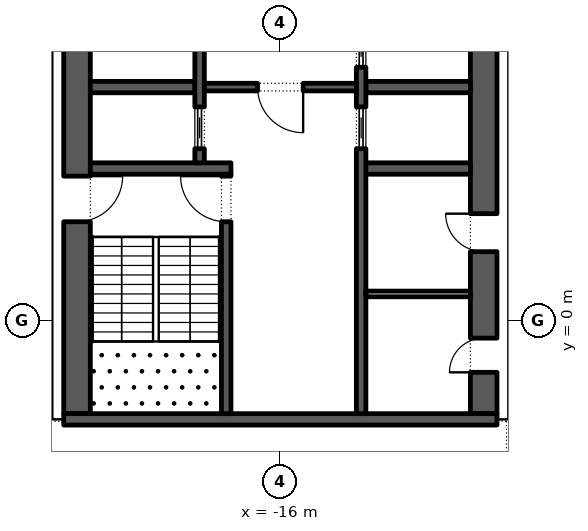
"""IFC4 building model, lengths in metres.
Left out: names, types, materials, properties, quantities, classifications, styles, units other than length and angle.
Written with IfcOpenShell. Run it as: python <this file> out.ifc"""

import sys

from ifc_helpers import new_model, si_unit, direction, frame, frame_2d, origin, place, context, subcontext, project, spatial, rectangle, extrude, element, fill, save


model = new_model("IFC4")
c1 = context("Model", 3, precision=1e-05, world=origin(), true_north=direction((0.0, 1.0)))
c2 = subcontext(c1, "Body", "Model", "MODEL_VIEW")
j1 = project(units=[si_unit("LENGTHUNIT", "METRE"), si_unit("PLANEANGLEUNIT", "RADIAN")], contexts=[c1])
p1 = place(None, origin())
s1 = spatial("IfcSite", under=j1, at=p1, CompositionType="ELEMENT")
p2 = place(p1, origin())
s2 = spatial("IfcBuilding", under=s1, at=p2, CompositionType="ELEMENT")
p3 = place(p2, frame((0.0, 0.0, 217.8)))
s3 = spatial("IfcBuildingStorey", under=s2, at=p3, CompositionType="ELEMENT", Elevation=217.8)
p4 = place(p3, frame((-33.157, 30.092, 0.0), z_axis=(0.0, 0.0, 1.0), x_axis=(0.224950279389, -0.974370243697, 0.0)))
e1 = element("IfcWall", 1, at=p4, inside=s3, PredefinedType="STANDARD", context=c2, shape_type="SweptSolid", body=[
    extrude(rectangle(XDim=49.5, YDim=0.3, at=frame_2d((24.75, 0.0))), origin(), (0.0, 0.0, 1.0), 3.95),
])
p5 = place(p4, frame((2.207, 0.0, 0.0)))
e2 = element("IfcOpeningElement", 2, at=p5, cuts=e1, PredefinedType="OPENING", context=c2, shape_type="SweptSolid", body=[
    extrude(rectangle(XDim=2.4, YDim=3.5, at=frame_2d((1.2, 1.75))), frame((0.0, 0.16, 0.0), z_axis=(0.0, -1.0, 0.0), x_axis=(1.0, 0.0, 0.0)), (0.0, 0.0, 1.0), 0.32),
])
p6 = place(p4, frame((8.121, 0.0, 0.45)))
e3 = element("IfcOpeningElement", 3, at=p6, cuts=e1, PredefinedType="OPENING", context=c2, shape_type="SweptSolid", body=[
    extrude(rectangle(XDim=4.5, YDim=2.775, at=frame_2d((2.25, 1.387))), frame((0.0, 0.16, 0.0), z_axis=(0.0, -1.0, 0.0), x_axis=(1.0, 0.0, 0.0)), (0.0, 0.0, 1.0), 0.32),
])
p7 = place(p4, frame((15.236, 0.0, 0.45)))
e4 = element("IfcOpeningElement", 4, at=p7, cuts=e1, PredefinedType="OPENING", context=c2, shape_type="SweptSolid", body=[
    extrude(rectangle(XDim=4.5, YDim=2.9, at=frame_2d((2.25, 1.45))), frame((0.0, 0.16, 0.0), z_axis=(0.0, -1.0, 0.0), x_axis=(1.0, 0.0, 0.0)), (0.0, 0.0, 1.0), 0.32),
])
p8 = place(p4, frame((22.35, 0.0, 0.45)))
e5 = element("IfcOpeningElement", 5, at=p8, cuts=e1, PredefinedType="OPENING", context=c2, shape_type="SweptSolid", body=[
    extrude(rectangle(XDim=4.5, YDim=2.95, at=frame_2d((2.25, 1.475))), frame((0.0, 0.16, 0.0), z_axis=(0.0, -1.0, 0.0), x_axis=(1.0, 0.0, 0.0)), (0.0, 0.0, 1.0), 0.32),
])
p9 = place(p4, frame((30.514, 0.0, 0.0)))
e6 = element("IfcOpeningElement", 6, at=p9, cuts=e1, PredefinedType="OPENING", context=c2, shape_type="SweptSolid", body=[
    extrude(rectangle(XDim=2.4, YDim=3.5, at=frame_2d((1.2, 1.75))), frame((0.0, 0.16, 0.0), z_axis=(0.0, -1.0, 0.0), x_axis=(1.0, 0.0, 0.0)), (0.0, 0.0, 1.0), 0.32),
])
p10 = place(p4, frame((36.579, 0.0, 0.45)))
e7 = element("IfcOpeningElement", 7, at=p10, cuts=e1, PredefinedType="OPENING", context=c2, shape_type="SweptSolid", body=[
    extrude(rectangle(XDim=4.5, YDim=3.05, at=frame_2d((2.25, 1.525))), frame((0.0, 0.16, 0.0), z_axis=(0.0, -1.0, 0.0), x_axis=(1.0, 0.0, 0.0)), (0.0, 0.0, 1.0), 0.32),
])
p11 = place(p4, frame((43.693, 0.0, 0.45)))
e8 = element("IfcOpeningElement", 8, at=p11, cuts=e1, PredefinedType="OPENING", context=c2, shape_type="SweptSolid", body=[
    extrude(rectangle(XDim=4.5, YDim=3.05, at=frame_2d((2.25, 1.525))), frame((0.0, 0.16, 0.0), z_axis=(0.0, -1.0, 0.0), x_axis=(1.0, 0.0, 0.0)), (0.0, 0.0, 1.0), 0.32),
])
p12 = place(p3, frame((-21.35, -2.45, 0.0), z_axis=(0.0, 0.0, 1.0), x_axis=(0.0, 1.0, 0.0)))
e9 = element("IfcWall", 9, at=p12, inside=s3, PredefinedType="SHEAR", context=c2, shape_type="SweptSolid", body=[
    extrude(rectangle(XDim=27.9, YDim=0.7, at=frame_2d((13.95, 0.0))), origin(), (0.0, 0.0, 1.0), 3.95),
])
p13 = place(p12, frame((5.05, 0.0, 0.0)))
e10 = element("IfcOpeningElement", 10, at=p13, cuts=e9, PredefinedType="OPENING", context=c2, shape_type="SweptSolid", body=[
    extrude(rectangle(XDim=1.2, YDim=2.1, at=frame_2d((0.6, 1.05))), frame((0.0, 0.36, 0.0), z_axis=(0.0, -1.0, 0.0), x_axis=(1.0, 0.0, 0.0)), (0.0, 0.0, 1.0), 0.72),
])
p14 = place(p12, frame((21.65, 0.0, 0.0)))
e11 = element("IfcOpeningElement", 11, at=p14, cuts=e9, PredefinedType="OPENING", context=c2, shape_type="SweptSolid", body=[
    extrude(rectangle(XDim=1.2, YDim=2.1, at=frame_2d((0.6, 1.05))), frame((0.0, 0.36, 0.0), z_axis=(0.0, -1.0, 0.0), x_axis=(1.0, 0.0, 0.0)), (0.0, 0.0, 1.0), 0.72),
])
p15 = place(p3, frame((-10.65, -2.45, 0.0), z_axis=(0.0, 0.0, 1.0), x_axis=(0.0, 1.0, 0.0)))
e12 = element("IfcWall", 12, at=p15, inside=s3, PredefinedType="SHEAR", context=c2, shape_type="SweptSolid", body=[
    extrude(rectangle(XDim=27.9, YDim=0.7, at=frame_2d((13.95, 0.0))), origin(), (0.0, 0.0, 1.0), 3.95),
])
p16 = place(p15, frame((23.65, 0.0, 0.0)))
e13 = element("IfcOpeningElement", 13, at=p16, cuts=e12, PredefinedType="OPENING", context=c2, shape_type="SweptSolid", body=[
    extrude(rectangle(XDim=2.4, YDim=2.1, at=frame_2d((1.2, 1.05))), frame((0.0, 0.36, 0.0), z_axis=(0.0, -1.0, 0.0), x_axis=(1.0, 0.0, 0.0)), (0.0, 0.0, 1.0), 0.72),
])
p17 = place(p15, frame((1.087, 0.0, 0.0)))
e14 = element("IfcOpeningElement", 14, at=p17, cuts=e12, PredefinedType="OPENING", context=c2, shape_type="SweptSolid", body=[
    extrude(rectangle(XDim=0.9, YDim=2.1, at=frame_2d((0.45, 1.05))), frame((0.0, 0.36, 0.0), z_axis=(0.0, -1.0, 0.0), x_axis=(1.0, 0.0, 0.0)), (0.0, 0.0, 1.0), 0.72),
])
p18 = place(p15, frame((4.262, 0.0, 0.0)))
e15 = element("IfcOpeningElement", 15, at=p18, cuts=e12, PredefinedType="OPENING", context=c2, shape_type="SweptSolid", body=[
    extrude(rectangle(XDim=1.0, YDim=2.1, at=frame_2d((0.5, 1.05))), frame((0.0, 0.36, 0.0), z_axis=(0.0, -1.0, 0.0), x_axis=(1.0, 0.0, 0.0)), (0.0, 0.0, 1.0), 0.72),
])
p19 = place(p3, frame((-21.7, -2.6, 0.0), z_axis=(0.0, 0.0, 1.0), x_axis=(1.0, 0.0, 0.0)))
e16 = element("IfcWall", 16, at=p19, inside=s3, PredefinedType="SHEAR", context=c2, shape_type="SweptSolid", body=[
    extrude(rectangle(XDim=11.4, YDim=0.3, at=frame_2d((5.7, 0.0))), origin(), (0.0, 0.0, 1.0), 3.95),
])
p20 = place(p3, frame((-21.0, 4.0, 0.0), z_axis=(0.0, 0.0, 1.0), x_axis=(1.0, 0.0, 0.0)))
e17 = element("IfcWall", 17, at=p20, inside=s3, PredefinedType="SHEAR", context=c2, shape_type="SweptSolid", body=[
    extrude(rectangle(XDim=3.7, YDim=0.3, at=frame_2d((1.85, 0.0))), origin(), (0.0, 0.0, 1.0), 3.95),
])
p21 = place(p3, frame((-17.425, -2.45, 0.0), z_axis=(0.0, 0.0, 1.0), x_axis=(0.0, 1.0, 0.0)))
e18 = element("IfcWall", 18, at=p21, inside=s3, PredefinedType="SHEAR", context=c2, shape_type="SweptSolid", body=[
    extrude(rectangle(XDim=6.3, YDim=0.25, at=frame_2d((3.15, 0.0))), origin(), (0.0, 0.0, 1.0), 3.95),
])
p22 = place(p21, frame((5.05, 0.0, 0.0)))
e19 = element("IfcOpeningElement", 19, at=p22, cuts=e18, PredefinedType="OPENING", context=c2, shape_type="SweptSolid", body=[
    extrude(rectangle(XDim=1.2, YDim=2.1, at=frame_2d((0.6, 1.05))), frame((0.0, 0.135, 0.0), z_axis=(0.0, -1.0, 0.0), x_axis=(1.0, 0.0, 0.0)), (0.0, 0.0, 1.0), 0.27),
])
p23 = place(p3, frame((-21.0, 6.143, 0.0), z_axis=(0.0, 0.0, 1.0), x_axis=(1.0, 0.0, 0.0)))
e20 = element("IfcWall", 20, at=p23, inside=s3, PredefinedType="SHEAR", context=c2, shape_type="SweptSolid", body=[
    extrude(rectangle(XDim=2.75, YDim=0.3, at=frame_2d((1.375, 0.0))), origin(), (0.0, 0.0, 1.0), 3.95),
])
p24 = place(p3, frame((-18.125, 4.15, 0.0), z_axis=(0.0, 0.0, 1.0), x_axis=(0.0, 1.0, 0.0)))
e21 = element("IfcWall", 21, at=p24, inside=s3, PredefinedType="SHEAR", context=c2, shape_type="SweptSolid", body=[
    extrude(rectangle(XDim=14.7, YDim=0.25, at=frame_2d((7.35, 0.0))), origin(), (0.0, 0.0, 1.0), 3.95),
])
p25 = place(p24, frame((3.246, 0.0, 0.0)))
e22 = element("IfcOpeningElement", 22, at=p25, cuts=e21, PredefinedType="OPENING", context=c2, shape_type="SweptSolid", body=[
    extrude(rectangle(XDim=0.9, YDim=2.1, at=frame_2d((0.45, 1.05))), frame((0.0, 0.135, 0.0), z_axis=(0.0, -1.0, 0.0), x_axis=(1.0, 0.0, 0.0)), (0.0, 0.0, 1.0), 0.27),
])
p26 = place(p24, frame((8.454, 0.0, 0.0)))
e23 = element("IfcOpeningElement", 23, at=p26, cuts=e21, PredefinedType="OPENING", context=c2, shape_type="SweptSolid", body=[
    extrude(rectangle(XDim=0.9, YDim=2.1, at=frame_2d((0.45, 1.05))), frame((0.0, 0.135, 0.0), z_axis=(0.0, -1.0, 0.0), x_axis=(1.0, 0.0, 0.0)), (0.0, 0.0, 1.0), 0.27),
])
p27 = place(p24, frame((0.371, 0.0, 0.0)))
e24 = element("IfcOpeningElement", 24, at=p27, cuts=e21, PredefinedType="OPENING", context=c2, shape_type="SweptSolid", body=[
    extrude(rectangle(XDim=1.1, YDim=2.1, at=frame_2d((0.55, 1.05))), frame((0.0, 0.135, 0.0), z_axis=(0.0, -1.0, 0.0), x_axis=(1.0, 0.0, 0.0)), (0.0, 0.0, 1.0), 0.27),
])
p28 = place(p24, frame((13.229, 0.0, 0.0)))
e25 = element("IfcOpeningElement", 25, at=p28, cuts=e21, PredefinedType="OPENING", context=c2, shape_type="SweptSolid", body=[
    extrude(rectangle(XDim=1.1, YDim=2.1, at=frame_2d((0.55, 1.05))), frame((0.0, 0.135, 0.0), z_axis=(0.0, -1.0, 0.0), x_axis=(1.0, 0.0, 0.0)), (0.0, 0.0, 1.0), 0.27),
])
p29 = place(p3, frame((-14.0, 4.0, 0.0), z_axis=(0.0, 0.0, 1.0), x_axis=(1.0, 0.0, 0.0)))
e26 = element("IfcWall", 26, at=p29, inside=s3, PredefinedType="SHEAR", context=c2, shape_type="SweptSolid", body=[
    extrude(rectangle(XDim=3.0, YDim=0.3, at=frame_2d((1.5, 0.0))), origin(), (0.0, 0.0, 1.0), 3.95),
])
p30 = place(p3, frame((-13.75, 6.143, 0.0), z_axis=(0.0, 0.0, 1.0), x_axis=(1.0, 0.0, 0.0)))
e27 = element("IfcWall", 27, at=p30, inside=s3, PredefinedType="SHEAR", context=c2, shape_type="SweptSolid", body=[
    extrude(rectangle(XDim=2.75, YDim=0.3, at=frame_2d((1.375, 0.0))), origin(), (0.0, 0.0, 1.0), 3.95),
])
p31 = place(p3, frame((-13.875, -2.45, 0.0), z_axis=(0.0, 0.0, 1.0), x_axis=(0.0, 1.0, 0.0)))
e28 = element("IfcWall", 28, at=p31, inside=s3, PredefinedType="SHEAR", context=c2, shape_type="SweptSolid", body=[
    extrude(rectangle(XDim=21.3, YDim=0.25, at=frame_2d((10.65, 0.0))), origin(), (0.0, 0.0, 1.0), 3.95),
])
p32 = place(p31, frame((16.261, 0.0, 0.0)))
e29 = element("IfcOpeningElement", 29, at=p32, cuts=e28, PredefinedType="OPENING", context=c2, shape_type="SweptSolid", body=[
    extrude(rectangle(XDim=0.9, YDim=2.1, at=frame_2d((0.45, 1.05))), frame((0.0, 0.135, 0.0), z_axis=(0.0, -1.0, 0.0), x_axis=(1.0, 0.0, 0.0)), (0.0, 0.0, 1.0), 0.27),
])
p33 = place(p31, frame((19.325, 0.0, 0.0)))
e30 = element("IfcOpeningElement", 30, at=p33, cuts=e28, PredefinedType="OPENING", context=c2, shape_type="SweptSolid", body=[
    extrude(rectangle(XDim=0.9, YDim=2.1, at=frame_2d((0.45, 1.05))), frame((0.0, 0.135, 0.0), z_axis=(0.0, -1.0, 0.0), x_axis=(1.0, 0.0, 0.0)), (0.0, 0.0, 1.0), 0.27),
])
p34 = place(p31, frame((6.971, 0.0, 0.0)))
e31 = element("IfcOpeningElement", 31, at=p34, cuts=e28, PredefinedType="OPENING", context=c2, shape_type="SweptSolid", body=[
    extrude(rectangle(XDim=1.1, YDim=2.1, at=frame_2d((0.55, 1.05))), frame((0.0, 0.135, 0.0), z_axis=(0.0, -1.0, 0.0), x_axis=(1.0, 0.0, 0.0)), (0.0, 0.0, 1.0), 0.27),
])
p35 = place(p31, frame((9.114, 0.0, 0.0)))
e32 = element("IfcOpeningElement", 32, at=p35, cuts=e28, PredefinedType="OPENING", context=c2, shape_type="SweptSolid", body=[
    extrude(rectangle(XDim=1.1, YDim=2.1, at=frame_2d((0.55, 1.05))), frame((0.0, 0.135, 0.0), z_axis=(0.0, -1.0, 0.0), x_axis=(1.0, 0.0, 0.0)), (0.0, 0.0, 1.0), 0.27),
])
p36 = place(p31, frame((11.257, 0.0, 0.0)))
e33 = element("IfcOpeningElement", 33, at=p36, cuts=e28, PredefinedType="OPENING", context=c2, shape_type="SweptSolid", body=[
    extrude(rectangle(XDim=1.1, YDim=2.1, at=frame_2d((0.55, 1.05))), frame((0.0, 0.135, 0.0), z_axis=(0.0, -1.0, 0.0), x_axis=(1.0, 0.0, 0.0)), (0.0, 0.0, 1.0), 0.27),
])
p37 = place(p31, frame((13.4, 0.0, 0.0)))
e34 = element("IfcOpeningElement", 34, at=p37, cuts=e28, PredefinedType="OPENING", context=c2, shape_type="SweptSolid", body=[
    extrude(rectangle(XDim=1.1, YDim=2.1, at=frame_2d((0.55, 1.05))), frame((0.0, 0.135, 0.0), z_axis=(0.0, -1.0, 0.0), x_axis=(1.0, 0.0, 0.0)), (0.0, 0.0, 1.0), 0.27),
])
p38 = place(p3, frame((-18.0, 6.143, 0.0), z_axis=(0.0, 0.0, 1.0), x_axis=(1.0, 0.0, 0.0)))
e35 = element("IfcWall", 35, at=p38, inside=s3, PredefinedType="SHEAR", context=c2, shape_type="SweptSolid", body=[
    extrude(rectangle(XDim=4.0, YDim=0.2, at=frame_2d((2.0, 0.0))), origin(), (0.0, 0.0, 1.0), 3.95),
])
p39 = place(p38, frame((1.4, 0.0, 0.0)))
e36 = element("IfcOpeningElement", 36, at=p39, cuts=e35, PredefinedType="OPENING", context=c2, shape_type="SweptSolid", body=[
    extrude(rectangle(XDim=1.2, YDim=2.1, at=frame_2d((0.6, 1.05))), frame((0.0, 0.11, 0.0), z_axis=(0.0, -1.0, 0.0), x_axis=(1.0, 0.0, 0.0)), (0.0, 0.0, 1.0), 0.22),
])
p40 = place(p3, frame((-13.75, 0.7, 0.0), z_axis=(0.0, 0.0, 1.0), x_axis=(1.0, 0.0, 0.0)))
e37 = element("IfcWall", 37, at=p40, inside=s3, PredefinedType="PARTITIONING", context=c2, shape_type="SweptSolid", body=[
    extrude(rectangle(XDim=2.75, YDim=0.15, at=frame_2d((1.375, 0.0))), origin(), (0.0, 0.0, 1.0), 3.95),
])
p41 = place(p27, origin())
e38 = element("IfcDoor", 38, at=p41, inside=s3, OperationType="SLIDING_TO_LEFT", PredefinedType="DOOR", context=c2, shape_type="SweptSolid", body=[
    extrude(rectangle(XDim=1.1, YDim=2.1, at=frame_2d((0.55, 1.05))), frame((0.0, 0.025, 0.0), z_axis=(0.0, -1.0, 0.0), x_axis=(1.0, 0.0, 0.0)), (0.0, 0.0, 1.0), 0.05),
])
fill(e24, e38)
p42 = place(p34, origin())
e39 = element("IfcDoor", 39, at=p42, inside=s3, OperationType="SLIDING_TO_LEFT", PredefinedType="DOOR", context=c2, shape_type="SweptSolid", body=[
    extrude(rectangle(XDim=1.1, YDim=2.1, at=frame_2d((0.55, 1.05))), frame((0.0, 0.025, 0.0), z_axis=(0.0, -1.0, 0.0), x_axis=(1.0, 0.0, 0.0)), (0.0, 0.0, 1.0), 0.05),
])
fill(e31, e39)
p43 = place(p35, origin())
e40 = element("IfcDoor", 40, at=p43, inside=s3, OperationType="SLIDING_TO_LEFT", PredefinedType="DOOR", context=c2, shape_type="SweptSolid", body=[
    extrude(rectangle(XDim=1.1, YDim=2.1, at=frame_2d((0.55, 1.05))), frame((0.0, 0.025, 0.0), z_axis=(0.0, -1.0, 0.0), x_axis=(1.0, 0.0, 0.0)), (0.0, 0.0, 1.0), 0.05),
])
fill(e32, e40)
p44 = place(p39, frame((1.2, 0.0, 0.0), z_axis=(0.0, 0.0, 1.0), x_axis=(-1.0, 0.0, 0.0)))
e41 = element("IfcDoor", 41, at=p44, inside=s3, OperationType="SINGLE_SWING_RIGHT", PredefinedType="DOOR", context=c2, shape_type="SweptSolid", body=[
    extrude(rectangle(XDim=1.2, YDim=2.1, at=frame_2d((0.6, 1.05))), frame((0.0, 0.025, 0.0), z_axis=(0.0, -1.0, 0.0), x_axis=(1.0, 0.0, 0.0)), (0.0, 0.0, 1.0), 0.05),
])
fill(e36, e41)
p45 = place(p22, origin())
e42 = element("IfcDoor", 42, at=p45, inside=s3, OperationType="SINGLE_SWING_LEFT", PredefinedType="DOOR", context=c2, shape_type="SweptSolid", body=[
    extrude(rectangle(XDim=1.2, YDim=2.1, at=frame_2d((0.6, 1.05))), frame((0.0, 0.025, 0.0), z_axis=(0.0, -1.0, 0.0), x_axis=(1.0, 0.0, 0.0)), (0.0, 0.0, 1.0), 0.05),
])
fill(e19, e42)
p46 = place(p13, frame((1.2, 0.0, 0.0), z_axis=(0.0, 0.0, 1.0), x_axis=(-1.0, 0.0, 0.0)))
e43 = element("IfcDoor", 43, at=p46, inside=s3, OperationType="SINGLE_SWING_RIGHT", PredefinedType="DOOR", context=c2, shape_type="SweptSolid", body=[
    extrude(rectangle(XDim=1.2, YDim=2.1, at=frame_2d((0.6, 1.05))), frame((0.0, 0.025, 0.0), z_axis=(0.0, -1.0, 0.0), x_axis=(1.0, 0.0, 0.0)), (0.0, 0.0, 1.0), 0.05),
])
fill(e10, e43)
p47 = place(p17, origin())
e44 = element("IfcDoor", 44, at=p47, inside=s3, OperationType="SINGLE_SWING_RIGHT", PredefinedType="DOOR", context=c2, shape_type="SweptSolid", body=[
    extrude(rectangle(XDim=0.9, YDim=2.1, at=frame_2d((0.45, 1.05))), frame((0.0, 0.35, 0.0), z_axis=(0.0, -1.0, 0.0), x_axis=(1.0, 0.0, 0.0)), (0.0, 0.0, 1.0), 0.05),
])
fill(e14, e44)
p48 = place(p18, origin())
e45 = element("IfcDoor", 45, at=p48, inside=s3, OperationType="SINGLE_SWING_LEFT", PredefinedType="DOOR", context=c2, shape_type="SweptSolid", body=[
    extrude(rectangle(XDim=1.0, YDim=2.1, at=frame_2d((0.5, 1.05))), frame((0.0, 0.35, 0.0), z_axis=(0.0, -1.0, 0.0), x_axis=(1.0, 0.0, 0.0)), (0.0, 0.0, 1.0), 0.05),
])
fill(e15, e45)
save(model, sys.argv[1])
